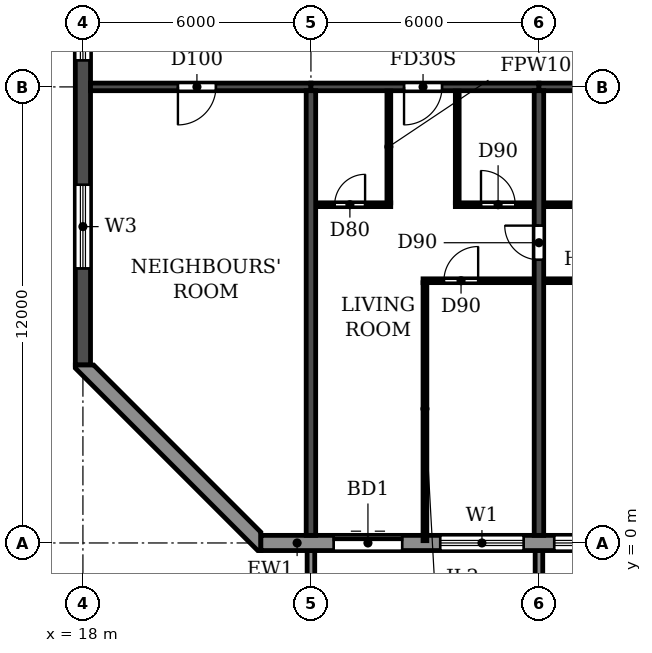
"""IFC4 building model, lengths in metres.
Left out: names, types, materials, properties, quantities, classifications, styles, units other than length and angle.
Written with IfcOpenShell. Run it as: python <this file> out.ifc"""

import sys

from ifc_helpers import new_model, si_unit, direction, frame, frame_2d, origin, place, context, subcontext, project, spatial, polyline, rectangle, outline, extrude, source, transform, mapped, element, fill, save


model = new_model("IFC4")
c1 = context("Model", 3, precision=1e-05, world=origin(), true_north=direction((0.0, 1.0)))
c2 = subcontext(c1, "Body", "Model", "MODEL_VIEW")
j1 = project(units=[si_unit("LENGTHUNIT", "METRE"), si_unit("PLANEANGLEUNIT", "RADIAN")], contexts=[c1])
p1 = place(None, origin())
s1 = spatial("IfcSite", under=j1, at=p1, CompositionType="ELEMENT")
p2 = place(p1, origin())
s2 = spatial("IfcBuilding", under=s1, at=p2, CompositionType="ELEMENT")
p3 = place(p2, frame((0.0, 0.0, 208.2)))
s3 = spatial("IfcBuildingStorey", under=s2, at=p3, CompositionType="ELEMENT", Elevation=208.2)
p4 = place(p3, frame((24.0, 0.2, 0.0), z_axis=(0.0, 0.0, 1.0), x_axis=(0.0, 1.0, 0.0)))
e1 = element("IfcWall", 1, at=p4, inside=s3, PredefinedType="SHEAR", context=c2, shape_type="SweptSolid", body=[
    extrude(rectangle(XDim=11.7, YDim=0.25, at=frame_2d((5.85, 0.0))), origin(), (0.0, 0.0, 1.0), 3.0),
])
p5 = place(p3, frame((30.0, 0.2, 0.0), z_axis=(0.0, 0.0, 1.0), x_axis=(0.0, 1.0, 0.0)))
e2 = element("IfcWall", 2, at=p5, inside=s3, PredefinedType="SHEAR", context=c2, shape_type="SweptSolid", body=[
    extrude(rectangle(XDim=11.7, YDim=0.25, at=frame_2d((5.85, 0.0))), origin(), (0.0, 0.0, 1.0), 3.0),
])
p6 = place(p5, frame((7.25, 0.0, 0.0)))
e3 = element("IfcOpeningElement", 3, at=p6, cuts=e2, PredefinedType="OPENING", context=c2, shape_type="SweptSolid", body=[
    extrude(rectangle(XDim=0.9, YDim=2.1, at=frame_2d((0.45, 1.05))), frame((0.0, 0.135, 0.0), z_axis=(0.0, -1.0, 0.0), x_axis=(1.0, 0.0, 0.0)), (0.0, 0.0, 1.0), 0.27),
])
p7 = place(p3, frame((18.0, 4.683, 0.0), z_axis=(0.0, 0.0, 1.0), x_axis=(0.0, 1.0, 0.0)))
e4 = element("IfcWall", 4, at=p7, inside=s3, PredefinedType="SHEAR", context=c2, shape_type="SweptSolid", body=[
    extrude(rectangle(XDim=31.834, YDim=0.4, at=frame_2d((15.917, 0.0))), origin(), (0.0, 0.0, 1.0), 3.0),
])
p8 = place(p7, frame((23.817, 0.0, 0.9)))
e5 = element("IfcOpeningElement", 5, at=p8, cuts=e4, PredefinedType="OPENING", context=c2, shape_type="SweptSolid", body=[
    extrude(rectangle(XDim=1.2, YDim=1.5, at=frame_2d((0.6, 0.75))), frame((0.0, 0.21, 0.0), z_axis=(0.0, -1.0, 0.0), x_axis=(1.0, 0.0, 0.0)), (0.0, 0.0, 1.0), 0.42),
])
p9 = place(p7, frame((8.017, 0.0, 0.9)))
e6 = element("IfcOpeningElement", 6, at=p9, cuts=e4, PredefinedType="OPENING", context=c2, shape_type="SweptSolid", body=[
    extrude(rectangle(XDim=1.2, YDim=1.5, at=frame_2d((0.6, 0.75))), frame((0.0, 0.21, 0.0), z_axis=(0.0, -1.0, 0.0), x_axis=(1.0, 0.0, 0.0)), (0.0, 0.0, 1.0), 0.42),
])
p10 = place(p7, frame((27.694, 0.0, 0.6)))
e7 = element("IfcOpeningElement", 7, at=p10, cuts=e4, PredefinedType="OPENING", context=c2, shape_type="SweptSolid", body=[
    extrude(rectangle(XDim=2.2, YDim=1.8, at=frame_2d((1.1, 0.9))), frame((0.0, 0.21, 0.0), z_axis=(0.0, -1.0, 0.0), x_axis=(1.0, 0.0, 0.0)), (0.0, 0.0, 1.0), 0.42),
])
p11 = place(p7, frame((2.541, 0.0, 0.6)))
e8 = element("IfcOpeningElement", 8, at=p11, cuts=e4, PredefinedType="OPENING", context=c2, shape_type="SweptSolid", body=[
    extrude(rectangle(XDim=2.2, YDim=1.8, at=frame_2d((1.1, 0.9))), frame((0.0, 0.21, 0.0), z_axis=(0.0, -1.0, 0.0), x_axis=(1.0, 0.0, 0.0)), (0.0, 0.0, 1.0), 0.42),
])
p12 = place(p7, frame((15.917, 0.0, 0.9)))
e9 = element("IfcOpeningElement", 9, at=p12, cuts=e4, PredefinedType="OPENING", context=c2, shape_type="SweptSolid", body=[
    extrude(rectangle(XDim=1.2, YDim=1.5, at=frame_2d((0.6, 0.75))), frame((0.0, 0.21, 0.0), z_axis=(0.0, -1.0, 0.0), x_axis=(1.0, 0.0, 0.0)), (0.0, 0.0, 1.0), 0.42),
])
p13 = place(p3, frame((18.2, 12.0, 0.0), z_axis=(0.0, 0.0, 1.0), x_axis=(1.0, 0.0, 0.0)))
e10 = element("IfcWall", 10, at=p13, inside=s3, PredefinedType="SHEAR", context=c2, shape_type="SweptSolid", body=[
    extrude(rectangle(XDim=5.8, YDim=0.2, at=frame_2d((2.9, 0.0))), origin(), (0.0, 0.0, 1.0), 2.4),
])
p14 = place(p13, frame((2.3, 0.0, 0.0)))
e11 = element("IfcOpeningElement", 11, at=p14, cuts=e10, PredefinedType="OPENING", context=c2, shape_type="SweptSolid", body=[
    extrude(rectangle(XDim=1.0, YDim=2.1, at=frame_2d((0.5, 1.05))), frame((0.0, 0.11, 0.0), z_axis=(0.0, -1.0, 0.0), x_axis=(1.0, 0.0, 0.0)), (0.0, 0.0, 1.0), 0.22),
])
p15 = place(p3, frame((24.0, 12.0, 0.0), z_axis=(0.0, 0.0, 1.0), x_axis=(1.0, 0.0, 0.0)))
e12 = element("IfcWall", 12, at=p15, inside=s3, PredefinedType="SHEAR", context=c2, shape_type="SweptSolid", body=[
    extrude(rectangle(XDim=6.0, YDim=0.2, at=frame_2d((3.0, 0.0))), origin(), (0.0, 0.0, 1.0), 2.4),
])
p16 = place(p15, frame((2.45, 0.0, 0.0)))
e13 = element("IfcOpeningElement", 13, at=p16, cuts=e12, PredefinedType="OPENING", context=c2, shape_type="SweptSolid", body=[
    extrude(rectangle(XDim=1.0, YDim=2.1, at=frame_2d((0.5, 1.05))), frame((0.0, 0.11, 0.0), z_axis=(0.0, -1.0, 0.0), x_axis=(1.0, 0.0, 0.0)), (0.0, 0.0, 1.0), 0.22),
])
p17 = place(p3, frame((30.0, 12.0, 0.0), z_axis=(0.0, 0.0, 1.0), x_axis=(1.0, 0.0, 0.0)))
e14 = element("IfcWall", 14, at=p17, inside=s3, PredefinedType="SHEAR", context=c2, shape_type="SweptSolid", body=[
    extrude(rectangle(XDim=6.0, YDim=0.2, at=frame_2d((3.0, 0.0))), origin(), (0.0, 0.0, 1.0), 2.4),
])
p18 = place(p3, frame((22.683, 0.0, 0.0), z_axis=(0.0, 0.0, 1.0), x_axis=(1.0, 0.0, 0.0)))
e15 = element("IfcWall", 15, at=p18, inside=s3, PredefinedType="STANDARD", context=c2, shape_type="SweptSolid", body=[
    extrude(rectangle(XDim=56.634, YDim=0.4, at=frame_2d((28.317, 0.0))), origin(), (0.0, 0.0, 1.0), 3.0),
])
p19 = place(p18, frame((1.917, 0.0, 0.0)))
e16 = element("IfcOpeningElement", 16, at=p19, cuts=e15, PredefinedType="OPENING", context=c2, shape_type="SweptSolid", body=[
    extrude(rectangle(XDim=1.8, YDim=2.4, at=frame_2d((0.9, 1.2))), frame((0.0, 0.21, 0.0), z_axis=(0.0, -1.0, 0.0), x_axis=(1.0, 0.0, 0.0)), (0.0, 0.0, 1.0), 0.42),
])
p20 = place(p18, frame((4.717, 0.0, 0.9)))
e17 = element("IfcOpeningElement", 17, at=p20, cuts=e15, PredefinedType="OPENING", context=c2, shape_type="SweptSolid", body=[
    extrude(rectangle(XDim=2.2, YDim=1.5, at=frame_2d((1.1, 0.75))), frame((0.0, 0.21, 0.0), z_axis=(0.0, -1.0, 0.0), x_axis=(1.0, 0.0, 0.0)), (0.0, 0.0, 1.0), 0.42),
])
p21 = place(p18, frame((7.717, 0.0, 0.9)))
e18 = element("IfcOpeningElement", 18, at=p21, cuts=e15, PredefinedType="OPENING", context=c2, shape_type="SweptSolid", body=[
    extrude(rectangle(XDim=2.2, YDim=1.5, at=frame_2d((1.1, 0.75))), frame((0.0, 0.21, 0.0), z_axis=(0.0, -1.0, 0.0), x_axis=(1.0, 0.0, 0.0)), (0.0, 0.0, 1.0), 0.42),
])
p22 = place(p18, frame((10.717, 0.0, 0.9)))
e19 = element("IfcOpeningElement", 19, at=p22, cuts=e15, PredefinedType="OPENING", context=c2, shape_type="SweptSolid", body=[
    extrude(rectangle(XDim=2.2, YDim=1.5, at=frame_2d((1.1, 0.75))), frame((0.0, 0.21, 0.0), z_axis=(0.0, -1.0, 0.0), x_axis=(1.0, 0.0, 0.0)), (0.0, 0.0, 1.0), 0.42),
])
p23 = place(p18, frame((13.917, 0.0, 0.0)))
e20 = element("IfcOpeningElement", 20, at=p23, cuts=e15, PredefinedType="OPENING", context=c2, shape_type="SweptSolid", body=[
    extrude(rectangle(XDim=1.8, YDim=2.4, at=frame_2d((0.9, 1.2))), frame((0.0, 0.21, 0.0), z_axis=(0.0, -1.0, 0.0), x_axis=(1.0, 0.0, 0.0)), (0.0, 0.0, 1.0), 0.42),
])
p24 = place(p18, frame((16.717, 0.0, 0.9)))
e21 = element("IfcOpeningElement", 21, at=p24, cuts=e15, PredefinedType="OPENING", context=c2, shape_type="SweptSolid", body=[
    extrude(rectangle(XDim=2.2, YDim=1.5, at=frame_2d((1.1, 0.75))), frame((0.0, 0.21, 0.0), z_axis=(0.0, -1.0, 0.0), x_axis=(1.0, 0.0, 0.0)), (0.0, 0.0, 1.0), 0.42),
])
p25 = place(p18, frame((19.717, 0.0, 0.9)))
e22 = element("IfcOpeningElement", 22, at=p25, cuts=e15, PredefinedType="OPENING", context=c2, shape_type="SweptSolid", body=[
    extrude(rectangle(XDim=2.2, YDim=1.5, at=frame_2d((1.1, 0.75))), frame((0.0, 0.21, 0.0), z_axis=(0.0, -1.0, 0.0), x_axis=(1.0, 0.0, 0.0)), (0.0, 0.0, 1.0), 0.42),
])
p26 = place(p18, frame((22.717, 0.0, 0.9)))
e23 = element("IfcOpeningElement", 23, at=p26, cuts=e15, PredefinedType="OPENING", context=c2, shape_type="SweptSolid", body=[
    extrude(rectangle(XDim=2.2, YDim=1.5, at=frame_2d((1.1, 0.75))), frame((0.0, 0.21, 0.0), z_axis=(0.0, -1.0, 0.0), x_axis=(1.0, 0.0, 0.0)), (0.0, 0.0, 1.0), 0.42),
])
p27 = place(p18, frame((25.917, 0.0, 0.0)))
e24 = element("IfcOpeningElement", 24, at=p27, cuts=e15, PredefinedType="OPENING", context=c2, shape_type="SweptSolid", body=[
    extrude(rectangle(XDim=1.8, YDim=2.4, at=frame_2d((0.9, 1.2))), frame((0.0, 0.21, 0.0), z_axis=(0.0, -1.0, 0.0), x_axis=(1.0, 0.0, 0.0)), (0.0, 0.0, 1.0), 0.42),
])
p28 = place(p18, frame((28.717, 0.0, 0.9)))
e25 = element("IfcOpeningElement", 25, at=p28, cuts=e15, PredefinedType="OPENING", context=c2, shape_type="SweptSolid", body=[
    extrude(rectangle(XDim=2.2, YDim=1.5, at=frame_2d((1.1, 0.75))), frame((0.0, 0.21, 0.0), z_axis=(0.0, -1.0, 0.0), x_axis=(1.0, 0.0, 0.0)), (0.0, 0.0, 1.0), 0.42),
])
p29 = place(p18, frame((31.717, 0.0, 0.9)))
e26 = element("IfcOpeningElement", 26, at=p29, cuts=e15, PredefinedType="OPENING", context=c2, shape_type="SweptSolid", body=[
    extrude(rectangle(XDim=2.2, YDim=1.5, at=frame_2d((1.1, 0.75))), frame((0.0, 0.21, 0.0), z_axis=(0.0, -1.0, 0.0), x_axis=(1.0, 0.0, 0.0)), (0.0, 0.0, 1.0), 0.42),
])
p30 = place(p18, frame((34.717, 0.0, 0.9)))
e27 = element("IfcOpeningElement", 27, at=p30, cuts=e15, PredefinedType="OPENING", context=c2, shape_type="SweptSolid", body=[
    extrude(rectangle(XDim=2.2, YDim=1.5, at=frame_2d((1.1, 0.75))), frame((0.0, 0.21, 0.0), z_axis=(0.0, -1.0, 0.0), x_axis=(1.0, 0.0, 0.0)), (0.0, 0.0, 1.0), 0.42),
])
p31 = place(p18, frame((37.717, 0.0, 0.9)))
e28 = element("IfcOpeningElement", 28, at=p31, cuts=e15, PredefinedType="OPENING", context=c2, shape_type="SweptSolid", body=[
    extrude(rectangle(XDim=2.2, YDim=1.5, at=frame_2d((1.1, 0.75))), frame((0.0, 0.21, 0.0), z_axis=(0.0, -1.0, 0.0), x_axis=(1.0, 0.0, 0.0)), (0.0, 0.0, 1.0), 0.42),
])
p32 = place(p18, frame((40.717, 0.0, 0.9)))
e29 = element("IfcOpeningElement", 29, at=p32, cuts=e15, PredefinedType="OPENING", context=c2, shape_type="SweptSolid", body=[
    extrude(rectangle(XDim=2.2, YDim=1.5, at=frame_2d((1.1, 0.75))), frame((0.0, 0.21, 0.0), z_axis=(0.0, -1.0, 0.0), x_axis=(1.0, 0.0, 0.0)), (0.0, 0.0, 1.0), 0.42),
])
p33 = place(p18, frame((43.717, 0.0, 0.9)))
e30 = element("IfcOpeningElement", 30, at=p33, cuts=e15, PredefinedType="OPENING", context=c2, shape_type="SweptSolid", body=[
    extrude(rectangle(XDim=2.2, YDim=1.5, at=frame_2d((1.1, 0.75))), frame((0.0, 0.21, 0.0), z_axis=(0.0, -1.0, 0.0), x_axis=(1.0, 0.0, 0.0)), (0.0, 0.0, 1.0), 0.42),
])
p34 = place(p18, frame((46.717, 0.0, 0.9)))
e31 = element("IfcOpeningElement", 31, at=p34, cuts=e15, PredefinedType="OPENING", context=c2, shape_type="SweptSolid", body=[
    extrude(rectangle(XDim=2.2, YDim=1.5, at=frame_2d((1.1, 0.75))), frame((0.0, 0.21, 0.0), z_axis=(0.0, -1.0, 0.0), x_axis=(1.0, 0.0, 0.0)), (0.0, 0.0, 1.0), 0.42),
])
p35 = place(p18, frame((49.717, 0.0, 0.9)))
e32 = element("IfcOpeningElement", 32, at=p35, cuts=e15, PredefinedType="OPENING", context=c2, shape_type="SweptSolid", body=[
    extrude(rectangle(XDim=2.2, YDim=1.5, at=frame_2d((1.1, 0.75))), frame((0.0, 0.21, 0.0), z_axis=(0.0, -1.0, 0.0), x_axis=(1.0, 0.0, 0.0)), (0.0, 0.0, 1.0), 0.42),
])
p36 = place(p18, frame((52.917, 0.0, 0.0)))
e33 = element("IfcOpeningElement", 33, at=p36, cuts=e15, PredefinedType="OPENING", context=c2, shape_type="SweptSolid", body=[
    extrude(rectangle(XDim=1.8, YDim=2.4, at=frame_2d((0.9, 1.2))), frame((0.0, 0.21, 0.0), z_axis=(0.0, -1.0, 0.0), x_axis=(1.0, 0.0, 0.0)), (0.0, 0.0, 1.0), 0.42),
])
p37 = place(p3, origin())
e34 = element("IfcWall", 34, at=p37, inside=s3, PredefinedType="STANDARD", context=c2, shape_type="SweptSolid", body=[
    extrude(outline(polyline([(17.8, 4.683), (17.8, 4.6), (22.6, -0.2), (22.683, -0.2), (22.683, 0.283), (18.283, 4.683), (17.8, 4.683)])), origin(), (0.0, 0.0, 1.0), 3.0),
])
m1 = source(origin(), c2, "Body", "SweptSolid", [
    extrude(outline(polyline([(0.0, 0.0), (0.2, 0.0), (0.2, 1.65), (0.0, 1.65), (0.0, 0.0)])), origin(), (0.0, 0.0, 1.0), 3.1),
])
for number, where in (
    (35, (23.9, -1.85, 0.0)),
    (36, (29.9, -1.85, 0.0)),
):
    element("IfcWall", number, at=place(p3, frame(where)), inside=s3, PredefinedType="STANDARD", context=c2, shape_type="MappedRepresentation", body=[
        mapped(m1, transform((0.0, 0.0, 0.0))),
    ])
p38 = place(p3, frame((26.95, 6.9, 0.0), z_axis=(0.0, 0.0, 1.0), x_axis=(1.0, 0.0, 0.0)))
e37 = element("IfcWall", 37, at=p38, inside=s3, PredefinedType="PARTITIONING", context=c2, shape_type="SweptSolid", body=[
    extrude(rectangle(XDim=2.915, YDim=0.1, at=frame_2d((1.458, 0.0))), origin(), (0.0, 0.0, 1.0), 3.0),
])
p39 = place(p38, frame((0.55, 0.0, 0.0)))
e38 = element("IfcOpeningElement", 38, at=p39, cuts=e37, PredefinedType="OPENING", context=c2, shape_type="SweptSolid", body=[
    extrude(rectangle(XDim=0.9, YDim=2.1, at=frame_2d((0.45, 1.05))), frame((0.0, 0.06, 0.0), z_axis=(0.0, -1.0, 0.0), x_axis=(1.0, 0.0, 0.0)), (0.0, 0.0, 1.0), 0.12),
])
p40 = place(p3, frame((30.135, 6.9, 0.0), z_axis=(0.0, 0.0, 1.0), x_axis=(1.0, 0.0, 0.0)))
e39 = element("IfcWall", 39, at=p40, inside=s3, PredefinedType="PARTITIONING", context=c2, shape_type="SweptSolid", body=[
    extrude(rectangle(XDim=2.765, YDim=0.1, at=frame_2d((1.382, 0.0))), origin(), (0.0, 0.0, 1.0), 3.0),
])
p41 = place(p40, frame((1.465, 0.0, 0.0)))
e40 = element("IfcOpeningElement", 40, at=p41, cuts=e39, PredefinedType="OPENING", context=c2, shape_type="SweptSolid", body=[
    extrude(rectangle(XDim=0.9, YDim=2.1, at=frame_2d((0.45, 1.05))), frame((0.0, 0.06, 0.0), z_axis=(0.0, -1.0, 0.0), x_axis=(1.0, 0.0, 0.0)), (0.0, 0.0, 1.0), 0.12),
])
p42 = place(p3, frame((24.135, 8.9, 0.0), z_axis=(0.0, 0.0, 1.0), x_axis=(1.0, 0.0, 0.0)))
e41 = element("IfcWall", 41, at=p42, inside=s3, PredefinedType="PARTITIONING", context=c2, shape_type="SweptSolid", body=[
    extrude(rectangle(XDim=1.965, YDim=0.1, at=frame_2d((0.982, 0.0))), origin(), (0.0, 0.0, 1.0), 3.0),
])
p43 = place(p42, frame((0.49, 0.0, 0.0)))
e42 = element("IfcOpeningElement", 42, at=p43, cuts=e41, PredefinedType="OPENING", context=c2, shape_type="SweptSolid", body=[
    extrude(rectangle(XDim=0.8, YDim=2.1, at=frame_2d((0.4, 1.05))), frame((0.0, 0.06, 0.0), z_axis=(0.0, -1.0, 0.0), x_axis=(1.0, 0.0, 0.0)), (0.0, 0.0, 1.0), 0.12),
])
p44 = place(p3, frame((27.8, 8.9, 0.0), z_axis=(0.0, 0.0, 1.0), x_axis=(1.0, 0.0, 0.0)))
e43 = element("IfcWall", 43, at=p44, inside=s3, PredefinedType="PARTITIONING", context=c2, shape_type="SweptSolid", body=[
    extrude(rectangle(XDim=2.065, YDim=0.1, at=frame_2d((1.032, 0.0))), origin(), (0.0, 0.0, 1.0), 3.0),
])
p45 = place(p44, frame((0.675, 0.0, 0.0)))
e44 = element("IfcOpeningElement", 44, at=p45, cuts=e43, PredefinedType="OPENING", context=c2, shape_type="SweptSolid", body=[
    extrude(rectangle(XDim=0.9, YDim=2.1, at=frame_2d((0.45, 1.05))), frame((0.0, 0.06, 0.0), z_axis=(0.0, -1.0, 0.0), x_axis=(1.0, 0.0, 0.0)), (0.0, 0.0, 1.0), 0.12),
])
p46 = place(p3, frame((30.135, 8.9, 0.0), z_axis=(0.0, 0.0, 1.0), x_axis=(1.0, 0.0, 0.0)))
e45 = element("IfcWall", 45, at=p46, inside=s3, PredefinedType="PARTITIONING", context=c2, shape_type="SweptSolid", body=[
    extrude(rectangle(XDim=2.765, YDim=0.1, at=frame_2d((1.382, 0.0))), origin(), (0.0, 0.0, 1.0), 3.0),
])
p47 = place(p46, frame((0.965, 0.0, 0.0)))
e46 = element("IfcOpeningElement", 46, at=p47, cuts=e45, PredefinedType="OPENING", context=c2, shape_type="SweptSolid", body=[
    extrude(rectangle(XDim=0.8, YDim=2.1, at=frame_2d((0.4, 1.05))), frame((0.0, 0.06, 0.0), z_axis=(0.0, -1.0, 0.0), x_axis=(1.0, 0.0, 0.0)), (0.0, 0.0, 1.0), 0.12),
])
p48 = place(p3, frame((26.05, 8.95, 0.0), z_axis=(0.0, 0.0, 1.0), x_axis=(0.0, 1.0, 0.0)))
e47 = element("IfcWall", 47, at=p48, inside=s3, PredefinedType="PARTITIONING", context=c2, shape_type="SweptSolid", body=[
    extrude(rectangle(XDim=2.94, YDim=0.1, at=frame_2d((1.47, 0.0))), origin(), (0.0, 0.0, 1.0), 3.0),
])
p49 = place(p3, frame((27.0, 0.06, 0.0), z_axis=(0.0, 0.0, 1.0), x_axis=(0.0, 1.0, 0.0)))
e48 = element("IfcWall", 48, at=p49, inside=s3, PredefinedType="PARTITIONING", context=c2, shape_type="SweptSolid", body=[
    extrude(rectangle(XDim=6.79, YDim=0.1, at=frame_2d((3.395, 0.0))), origin(), (0.0, 0.0, 1.0), 3.0),
])
p50 = place(p3, frame((27.85, 8.95, 0.0), z_axis=(0.0, 0.0, 1.0), x_axis=(0.0, 1.0, 0.0)))
e49 = element("IfcWall", 49, at=p50, inside=s3, PredefinedType="PARTITIONING", context=c2, shape_type="SweptSolid", body=[
    extrude(rectangle(XDim=2.94, YDim=0.1, at=frame_2d((1.47, 0.0))), origin(), (0.0, 0.0, 1.0), 3.0),
])
p51 = place(p19, origin())
e50 = element("IfcDoor", 50, at=p51, inside=s3, OperationType="DOUBLE_DOOR_SLIDING", PredefinedType="DOOR", context=c2, shape_type="SweptSolid", body=[
    extrude(rectangle(XDim=1.8, YDim=2.4, at=frame_2d((0.9, 1.2))), frame((0.0, 0.025, 0.0), z_axis=(0.0, -1.0, 0.0), x_axis=(1.0, 0.0, 0.0)), (0.0, 0.0, 1.0), 0.05),
])
fill(e16, e50)
p52 = place(p20, origin())
e51 = element("IfcWindow", 51, at=p52, inside=s3, PartitioningType="DOUBLE_PANEL_HORIZONTAL", PredefinedType="WINDOW", context=c2, shape_type="SweptSolid", body=[
    extrude(rectangle(XDim=2.2, YDim=1.5, at=frame_2d((1.1, 0.75))), frame((0.0, 0.03, 0.0), z_axis=(0.0, -1.0, 0.0), x_axis=(1.0, 0.0, 0.0)), (0.0, 0.0, 1.0), 0.06),
])
fill(e17, e51)
p53 = place(p21, origin())
e52 = element("IfcWindow", 52, at=p53, inside=s3, PartitioningType="DOUBLE_PANEL_HORIZONTAL", PredefinedType="WINDOW", context=c2, shape_type="SweptSolid", body=[
    extrude(rectangle(XDim=2.2, YDim=1.5, at=frame_2d((1.1, 0.75))), frame((0.0, 0.03, 0.0), z_axis=(0.0, -1.0, 0.0), x_axis=(1.0, 0.0, 0.0)), (0.0, 0.0, 1.0), 0.06),
])
fill(e18, e52)
p54 = place(p9, origin())
e53 = element("IfcWindow", 53, at=p54, inside=s3, PartitioningType="SINGLE_PANEL", PredefinedType="WINDOW", context=c2, shape_type="SweptSolid", body=[
    extrude(rectangle(XDim=1.2, YDim=1.5, at=frame_2d((0.6, 0.75))), frame((0.0, 0.03, 0.0), z_axis=(0.0, -1.0, 0.0), x_axis=(1.0, 0.0, 0.0)), (0.0, 0.0, 1.0), 0.06),
])
fill(e6, e53)
p55 = place(p11, origin())
e54 = element("IfcWindow", 54, at=p55, inside=s3, PartitioningType="DOUBLE_PANEL_HORIZONTAL", PredefinedType="WINDOW", context=c2, shape_type="SweptSolid", body=[
    extrude(rectangle(XDim=2.2, YDim=1.8, at=frame_2d((1.1, 0.9))), frame((0.0, 0.03, 0.0), z_axis=(0.0, -1.0, 0.0), x_axis=(1.0, 0.0, 0.0)), (0.0, 0.0, 1.0), 0.06),
])
fill(e8, e54)
p56 = place(p14, frame((1.0, 0.0, 0.0), z_axis=(0.0, 0.0, 1.0), x_axis=(-1.0, 0.0, 0.0)))
e55 = element("IfcDoor", 55, at=p56, inside=s3, OperationType="SINGLE_SWING_RIGHT", PredefinedType="DOOR", context=c2, shape_type="SweptSolid", body=[
    extrude(rectangle(XDim=1.0, YDim=2.1, at=frame_2d((0.5, 1.05))), frame((0.0, 0.025, 0.0), z_axis=(0.0, -1.0, 0.0), x_axis=(1.0, 0.0, 0.0)), (0.0, 0.0, 1.0), 0.05),
])
fill(e11, e55)
p57 = place(p43, origin())
e56 = element("IfcDoor", 56, at=p57, inside=s3, OperationType="SINGLE_SWING_RIGHT", PredefinedType="DOOR", context=c2, shape_type="SweptSolid", body=[
    extrude(rectangle(XDim=0.8, YDim=2.1, at=frame_2d((0.4, 1.05))), frame((0.0, 0.025, 0.0), z_axis=(0.0, -1.0, 0.0), x_axis=(1.0, 0.0, 0.0)), (0.0, 0.0, 1.0), 0.05),
])
fill(e42, e56)
p58 = place(p16, frame((1.0, 0.0, 0.0), z_axis=(0.0, 0.0, 1.0), x_axis=(-1.0, 0.0, 0.0)))
e57 = element("IfcDoor", 57, at=p58, inside=s3, OperationType="SINGLE_SWING_RIGHT", PredefinedType="DOOR", context=c2, shape_type="SweptSolid", body=[
    extrude(rectangle(XDim=1.0, YDim=2.1, at=frame_2d((0.5, 1.05))), frame((0.0, 0.025, 0.0), z_axis=(0.0, -1.0, 0.0), x_axis=(1.0, 0.0, 0.0)), (0.0, 0.0, 1.0), 0.05),
])
fill(e13, e57)
p59 = place(p39, origin())
e58 = element("IfcDoor", 58, at=p59, inside=s3, OperationType="SINGLE_SWING_RIGHT", PredefinedType="DOOR", context=c2, shape_type="SweptSolid", body=[
    extrude(rectangle(XDim=0.9, YDim=2.1, at=frame_2d((0.45, 1.05))), frame((0.0, 0.025, 0.0), z_axis=(0.0, -1.0, 0.0), x_axis=(1.0, 0.0, 0.0)), (0.0, 0.0, 1.0), 0.05),
])
fill(e38, e58)
p60 = place(p45, origin())
e59 = element("IfcDoor", 59, at=p60, inside=s3, OperationType="SINGLE_SWING_LEFT", PredefinedType="DOOR", context=c2, shape_type="SweptSolid", body=[
    extrude(rectangle(XDim=0.9, YDim=2.1, at=frame_2d((0.45, 1.05))), frame((0.0, 0.025, 0.0), z_axis=(0.0, -1.0, 0.0), x_axis=(1.0, 0.0, 0.0)), (0.0, 0.0, 1.0), 0.05),
])
fill(e44, e59)
p61 = place(p6, origin())
e60 = element("IfcDoor", 60, at=p61, inside=s3, OperationType="SINGLE_SWING_RIGHT", PredefinedType="DOOR", context=c2, shape_type="SweptSolid", body=[
    extrude(rectangle(XDim=0.9, YDim=2.1, at=frame_2d((0.45, 1.05))), frame((0.0, 0.025, 0.0), z_axis=(0.0, -1.0, 0.0), x_axis=(1.0, 0.0, 0.0)), (0.0, 0.0, 1.0), 0.05),
])
fill(e3, e60)
save(model, sys.argv[1])
